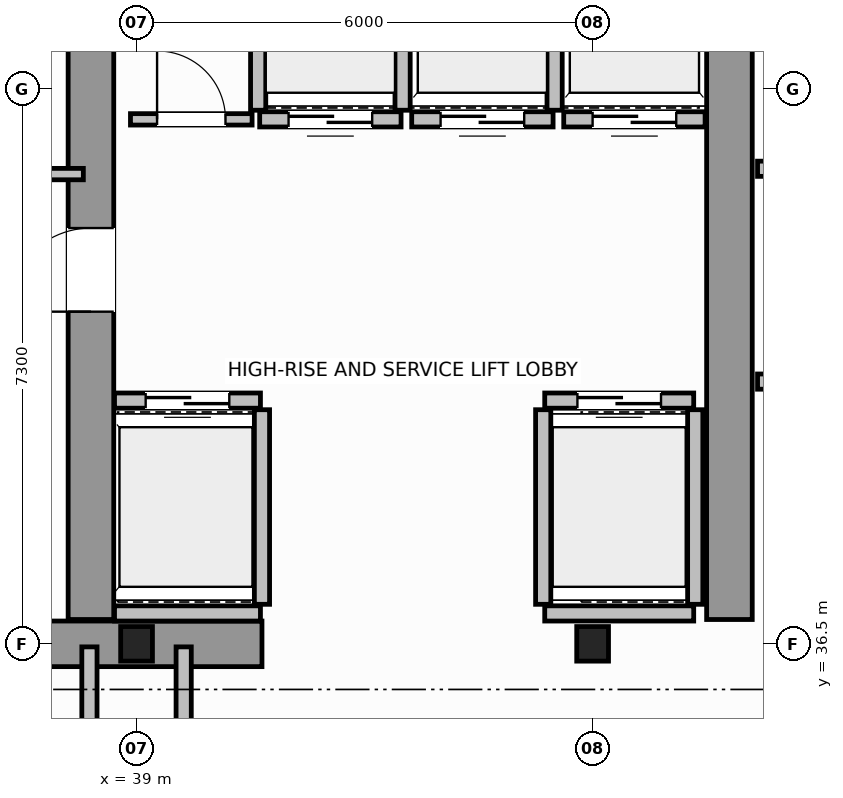
"""IFC4 building model, lengths in metres.
Left out: names, types, materials, properties, quantities, classifications, styles, units other than length and angle.
Written with IfcOpenShell. Run it as: python <this file> out.ifc"""

import sys

from ifc_helpers import new_model, si_unit, direction, frame, frame_2d, origin, origin_2d, place, context, subcontext, project, spatial, rectangle, i_section, extrude, source, transform, mapped, element, fill, save


model = new_model("IFC4")
c1 = context("Model", 3, precision=1e-05, world=origin(), true_north=direction((0.0, 1.0)))
c2 = subcontext(c1, "Body", "Model", "MODEL_VIEW")
j1 = project(units=[si_unit("LENGTHUNIT", "METRE"), si_unit("PLANEANGLEUNIT", "RADIAN")], contexts=[c1])
p1 = place(None, origin())
s1 = spatial("IfcSite", under=j1, at=p1, CompositionType="ELEMENT")
p2 = place(p1, origin())
s2 = spatial("IfcBuilding", under=s1, at=p2, CompositionType="ELEMENT")
p3 = place(p2, frame((0.0, 0.0, 218.4)))
s3 = spatial("IfcBuildingStorey", under=s2, at=p3, CompositionType="ELEMENT", Elevation=218.4)
m1 = source(origin(), c2, "Body", "SweptSolid", [
    extrude(i_section(OverallWidth=0.418, OverallDepth=0.455, WebThickness=0.042, FlangeThickness=0.058, FilletRadius=0.015, at=origin_2d()), origin(), (0.0, 0.0, 1.0), 4.8),
])
for number, where, z_axis, x_axis in (
    (1, (39.0, 36.5, 0.0), (0.0, 0.0, 1.0), (1.0, 0.0, 0.0)),
    (2, (45.0, 36.5, 0.0), (0.0, 0.0, 1.0), (1.0, 0.0, 0.0)),
):
    element("IfcColumn", number, at=place(p3, frame(where, z_axis=z_axis, x_axis=x_axis)), inside=s3, PredefinedType="COLUMN", context=c2, shape_type="MappedRepresentation", body=[
        mapped(m1, transform((0.0, 0.0, 0.0), scale=1.0)),
    ])
p4 = place(p3, frame((36.15, 36.5, 0.0), z_axis=(0.0, 0.0, 1.0), x_axis=(1.0, 0.0, 0.0)))
e3 = element("IfcWall", 3, at=p4, inside=s3, PredefinedType="SHEAR", context=c2, shape_type="SweptSolid", body=[
    extrude(rectangle(XDim=4.5, YDim=0.6, at=frame_2d((2.25, 0.0))), origin(), (0.0, 0.0, 1.0), 4.8),
])
p5 = place(p3, frame((38.4, 36.82, 0.0), z_axis=(0.0, 0.0, 1.0), x_axis=(0.0, 1.0, 0.0)))
e4 = element("IfcWall", 4, at=p5, inside=s3, PredefinedType="SHEAR", context=c2, shape_type="SweptSolid", body=[
    extrude(rectangle(XDim=9.38, YDim=0.6, at=frame_2d((4.69, 0.0))), origin(), (0.0, 0.0, 1.0), 4.8),
])
p6 = place(p5, frame((4.05, 0.0, 0.0)))
e5 = element("IfcOpeningElement", 5, at=p6, cuts=e4, PredefinedType="OPENING", context=c2, shape_type="SweptSolid", body=[
    extrude(rectangle(XDim=1.1, YDim=2.15, at=frame_2d((0.55, 1.075))), frame((0.0, 0.31, 0.0), z_axis=(0.0, -1.0, 0.0), x_axis=(1.0, 0.0, 0.0)), (0.0, 0.0, 1.0), 0.62),
])
p7 = place(p3, frame((46.8, 36.82, 0.0), z_axis=(0.0, 0.0, 1.0), x_axis=(0.0, 1.0, 0.0)))
e6 = element("IfcWall", 6, at=p7, inside=s3, PredefinedType="SHEAR", context=c2, shape_type="SweptSolid", body=[
    extrude(rectangle(XDim=9.38, YDim=0.6, at=frame_2d((4.69, 0.0))), origin(), (0.0, 0.0, 1.0), 4.8),
])
p8 = place(p3, frame((38.71, 39.7, 0.0), z_axis=(0.0, 0.0, 1.0), x_axis=(1.0, 0.0, 0.0)))
e7 = element("IfcWall", 7, at=p8, inside=s3, PredefinedType="SOLIDWALL", context=c2, shape_type="SweptSolid", body=[
    extrude(rectangle(XDim=1.92, YDim=0.2, at=frame_2d((0.96, 0.0))), origin(), (0.0, 0.0, 1.0), 4.54),
])
p9 = place(p8, frame((0.41, 0.0, 0.0)))
e8 = element("IfcOpeningElement", 8, at=p9, cuts=e7, PredefinedType="OPENING", context=c2, shape_type="SweptSolid", body=[
    extrude(rectangle(XDim=1.1, YDim=2.15, at=frame_2d((0.55, 1.075))), frame((0.0, 0.11, 0.0), z_axis=(0.0, -1.0, 0.0), x_axis=(1.0, 0.0, 0.0)), (0.0, 0.0, 1.0), 0.22),
])
p10 = place(p3, frame((38.71, 36.9, 0.0), z_axis=(0.0, 0.0, 1.0), x_axis=(1.0, 0.0, 0.0)))
e9 = element("IfcWall", 9, at=p10, inside=s3, PredefinedType="SOLIDWALL", context=c2, shape_type="SweptSolid", body=[
    extrude(rectangle(XDim=1.92, YDim=0.2, at=frame_2d((0.96, 0.0))), origin(), (0.0, 0.0, 1.0), 4.54),
])
p11 = place(p3, frame((40.65, 37.02, 0.0), z_axis=(0.0, 0.0, 1.0), x_axis=(0.0, 1.0, 0.0)))
e10 = element("IfcWall", 10, at=p11, inside=s3, PredefinedType="SOLIDWALL", context=c2, shape_type="SweptSolid", body=[
    extrude(rectangle(XDim=2.56, YDim=0.2, at=frame_2d((1.28, 0.0))), origin(), (0.0, 0.0, 1.0), 4.54),
])
p12 = place(p3, frame((44.37, 39.7, 0.0), z_axis=(0.0, 0.0, 1.0), x_axis=(1.0, 0.0, 0.0)))
e11 = element("IfcWall", 11, at=p12, inside=s3, PredefinedType="SOLIDWALL", context=c2, shape_type="SweptSolid", body=[
    extrude(rectangle(XDim=1.96, YDim=0.2, at=frame_2d((0.98, 0.0))), origin(), (0.0, 0.0, 1.0), 4.54),
])
p13 = place(p12, frame((0.43, 0.0, 0.0)))
e12 = element("IfcOpeningElement", 12, at=p13, cuts=e11, PredefinedType="OPENING", context=c2, shape_type="SweptSolid", body=[
    extrude(rectangle(XDim=1.1, YDim=2.15, at=frame_2d((0.55, 1.075))), frame((0.0, 0.11, 0.0), z_axis=(0.0, -1.0, 0.0), x_axis=(1.0, 0.0, 0.0)), (0.0, 0.0, 1.0), 0.22),
])
p14 = place(p3, frame((44.37, 36.9, 0.0), z_axis=(0.0, 0.0, 1.0), x_axis=(1.0, 0.0, 0.0)))
e13 = element("IfcWall", 13, at=p14, inside=s3, PredefinedType="SOLIDWALL", context=c2, shape_type="SweptSolid", body=[
    extrude(rectangle(XDim=1.96, YDim=0.2, at=frame_2d((0.98, 0.0))), origin(), (0.0, 0.0, 1.0), 3.53),
])
for number, where, z_axis, x_axis in (
    (14, (44.35, 37.02, 0.0), (0.0, 0.0, 1.0), (0.0, 1.0, 0.0)),
    (15, (46.35, 37.02, 0.0), (0.0, 0.0, 1.0), (0.0, 1.0, 0.0)),
):
    element("IfcWall", number, at=place(p3, frame(where, z_axis=z_axis, x_axis=x_axis)), inside=s3, PredefinedType="SOLIDWALL", context=c2, shape_type="SweptSolid", body=[
        extrude(rectangle(XDim=2.56, YDim=0.2, at=frame_2d((1.28, 0.0))), origin(), (0.0, 0.0, 1.0), 4.54),
    ])
p15 = place(p3, frame((40.62, 43.4, 0.0), z_axis=(0.0, 0.0, 1.0), x_axis=(1.0, 0.0, 0.0)))
e16 = element("IfcWall", 16, at=p15, inside=s3, PredefinedType="SOLIDWALL", context=c2, shape_type="SweptSolid", body=[
    extrude(rectangle(XDim=1.86, YDim=0.2, at=frame_2d((0.93, 0.0))), origin(), (0.0, 0.0, 1.0), 4.54),
])
p16 = place(p15, frame((0.38, 0.0, 0.0)))
e17 = element("IfcOpeningElement", 17, at=p16, cuts=e16, PredefinedType="OPENING", context=c2, shape_type="SweptSolid", body=[
    extrude(rectangle(XDim=1.1, YDim=2.15, at=frame_2d((0.55, 1.075))), frame((0.0, 0.11, 0.0), z_axis=(0.0, -1.0, 0.0), x_axis=(1.0, 0.0, 0.0)), (0.0, 0.0, 1.0), 0.22),
])
for number, where, z_axis, x_axis in (
    (18, (40.6, 43.52, 0.0), (0.0, 0.0, 1.0), (0.0, 1.0, 0.0)),
    (19, (42.5, 43.52, 0.0), (0.0, 0.0, 1.0), (0.0, 1.0, 0.0)),
):
    element("IfcWall", number, at=place(p3, frame(where, z_axis=z_axis, x_axis=x_axis)), inside=s3, PredefinedType="SOLIDWALL", context=c2, shape_type="SweptSolid", body=[
        extrude(rectangle(XDim=2.56, YDim=0.2, at=frame_2d((1.28, 0.0))), origin(), (0.0, 0.0, 1.0), 4.54),
    ])
p17 = place(p3, frame((42.62, 43.4, 0.0), z_axis=(0.0, 0.0, 1.0), x_axis=(1.0, 0.0, 0.0)))
e20 = element("IfcWall", 20, at=p17, inside=s3, PredefinedType="SOLIDWALL", context=c2, shape_type="SweptSolid", body=[
    extrude(rectangle(XDim=1.86, YDim=0.2, at=frame_2d((0.93, 0.0))), origin(), (0.0, 0.0, 1.0), 4.54),
])
p18 = place(p17, frame((0.38, 0.0, 0.0)))
e21 = element("IfcOpeningElement", 21, at=p18, cuts=e20, PredefinedType="OPENING", context=c2, shape_type="SweptSolid", body=[
    extrude(rectangle(XDim=1.1, YDim=2.15, at=frame_2d((0.55, 1.075))), frame((0.0, 0.11, 0.0), z_axis=(0.0, -1.0, 0.0), x_axis=(1.0, 0.0, 0.0)), (0.0, 0.0, 1.0), 0.22),
])
p19 = place(p3, frame((44.5, 43.52, 0.0), z_axis=(0.0, 0.0, 1.0), x_axis=(0.0, 1.0, 0.0)))
e22 = element("IfcWall", 22, at=p19, inside=s3, PredefinedType="SOLIDWALL", context=c2, shape_type="SweptSolid", body=[
    extrude(rectangle(XDim=2.56, YDim=0.2, at=frame_2d((1.28, 0.0))), origin(), (0.0, 0.0, 1.0), 4.54),
])
p20 = place(p3, frame((44.62, 43.4, 0.0), z_axis=(0.0, 0.0, 1.0), x_axis=(1.0, 0.0, 0.0)))
e23 = element("IfcWall", 23, at=p20, inside=s3, PredefinedType="SOLIDWALL", context=c2, shape_type="SweptSolid", body=[
    extrude(rectangle(XDim=1.86, YDim=0.2, at=frame_2d((0.93, 0.0))), origin(), (0.0, 0.0, 1.0), 4.54),
])
p21 = place(p20, frame((0.38, 0.0, 0.0)))
e24 = element("IfcOpeningElement", 24, at=p21, cuts=e23, PredefinedType="OPENING", context=c2, shape_type="SweptSolid", body=[
    extrude(rectangle(XDim=1.1, YDim=2.15, at=frame_2d((0.55, 1.075))), frame((0.0, 0.11, 0.0), z_axis=(0.0, -1.0, 0.0), x_axis=(1.0, 0.0, 0.0)), (0.0, 0.0, 1.0), 0.22),
])
p22 = place(p3, frame((47.17, 39.95, 0.0), z_axis=(0.0, 0.0, 1.0), x_axis=(1.0, 0.0, 0.0)))
e25 = element("IfcWall", 25, at=p22, inside=s3, PredefinedType="SOLIDWALL", context=c2, shape_type="SweptSolid", body=[
    extrude(rectangle(XDim=2.16, YDim=0.2, at=frame_2d((1.08, 0.0))), origin(), (0.0, 0.0, 1.0), 4.54),
])
p23 = place(p22, frame((0.53, 0.0, 0.0)))
e26 = element("IfcOpeningElement", 26, at=p23, cuts=e25, PredefinedType="OPENING", context=c2, shape_type="SweptSolid", body=[
    extrude(rectangle(XDim=1.1, YDim=2.15, at=frame_2d((0.55, 1.075))), frame((0.0, 0.11, 0.0), z_axis=(0.0, -1.0, 0.0), x_axis=(1.0, 0.0, 0.0)), (0.0, 0.0, 1.0), 0.22),
])
p24 = place(p3, frame((47.17, 42.75, 0.0), z_axis=(0.0, 0.0, 1.0), x_axis=(1.0, 0.0, 0.0)))
e27 = element("IfcWall", 27, at=p24, inside=s3, PredefinedType="SOLIDWALL", context=c2, shape_type="SweptSolid", body=[
    extrude(rectangle(XDim=2.16, YDim=0.2, at=frame_2d((1.08, 0.0))), origin(), (0.0, 0.0, 1.0), 4.54),
])
p25 = place(p3, frame((29.9, 42.68, 0.0), z_axis=(0.0, 0.0, 1.0), x_axis=(1.0, 0.0, 0.0)))
e28 = element("IfcWall", 28, at=p25, inside=s3, PredefinedType="PARTITIONING", context=c2, shape_type="SweptSolid", body=[
    extrude(rectangle(XDim=8.4, YDim=0.15, at=frame_2d((4.2, 0.0))), origin(), (0.0, 0.0, 1.0), 4.54),
])
p26 = place(p25, frame((3.4, 0.0, 0.0)))
e29 = element("IfcOpeningElement", 29, at=p26, cuts=e28, PredefinedType="OPENING", context=c2, shape_type="SweptSolid", body=[
    extrude(rectangle(XDim=0.9, YDim=2.1, at=frame_2d((0.45, 1.05))), frame((0.0, 0.085, 0.0), z_axis=(0.0, -1.0, 0.0), x_axis=(1.0, 0.0, 0.0)), (0.0, 0.0, 1.0), 0.17),
])
p27 = place(p3, frame((38.92, 43.4, 0.0), z_axis=(0.0, 0.0, 1.0), x_axis=(1.0, 0.0, 0.0)))
e30 = element("IfcWall", 30, at=p27, inside=s3, PredefinedType="PARTITIONING", context=c2, shape_type="SweptSolid", body=[
    extrude(rectangle(XDim=1.6, YDim=0.15, at=frame_2d((0.8, 0.0))), origin(), (0.0, 0.0, 1.0), 4.54),
])
p28 = place(p27, frame((0.35, 0.0, 0.0)))
e31 = element("IfcOpeningElement", 31, at=p28, cuts=e30, PredefinedType="OPENING", context=c2, shape_type="SweptSolid", body=[
    extrude(rectangle(XDim=0.9, YDim=2.1, at=frame_2d((0.45, 1.05))), frame((0.0, 0.085, 0.0), z_axis=(0.0, -1.0, 0.0), x_axis=(1.0, 0.0, 0.0)), (0.0, 0.0, 1.0), 0.17),
])
for number, where, z_axis, x_axis in (
    (32, (38.38, 28.16, 0.0), (0.0, 0.0, 1.0), (0.0, 1.0, 0.0)),
    (33, (39.62, 28.16, 0.0), (0.0, 0.0, 1.0), (0.0, 1.0, 0.0)),
):
    element("IfcWall", number, at=place(p3, frame(where, z_axis=z_axis, x_axis=x_axis)), inside=s3, PredefinedType="SOLIDWALL", context=c2, shape_type="SweptSolid", body=[
        extrude(rectangle(XDim=8.3, YDim=0.2, at=frame_2d((4.15, 0.0))), origin(), (0.0, 0.0, 1.0), 4.54),
    ])
m2 = source(origin(), c2, "Body", "SweptSolid", [
    extrude(rectangle(XDim=1.1, YDim=2.15, at=frame_2d((0.55, 1.075))), frame((0.0, 0.025, 0.0), z_axis=(0.0, -1.0, 0.0), x_axis=(1.0, 0.0, 0.0)), (0.0, 0.0, 1.0), 0.05),
])
p29 = place(p9, origin())
e34 = element("IfcDoor", 34, at=p29, inside=s3, OperationType="DOUBLE_DOOR_SLIDING", PredefinedType="DOOR", context=c2, shape_type="MappedRepresentation", body=[
    mapped(m2, transform((0.0, 0.0, 0.0), scale=1.0)),
])
fill(e8, e34)
p30 = place(p13, origin())
e35 = element("IfcDoor", 35, at=p30, inside=s3, OperationType="DOUBLE_DOOR_SLIDING", PredefinedType="DOOR", context=c2, shape_type="MappedRepresentation", body=[
    mapped(m2, transform((0.0, 0.0, 0.0), scale=1.0)),
])
fill(e12, e35)
p31 = place(p16, origin())
e36 = element("IfcDoor", 36, at=p31, inside=s3, OperationType="DOUBLE_DOOR_SLIDING", PredefinedType="DOOR", context=c2, shape_type="MappedRepresentation", body=[
    mapped(m2, transform((0.0, 0.0, 0.0), scale=1.0)),
])
fill(e17, e36)
p32 = place(p18, origin())
e37 = element("IfcDoor", 37, at=p32, inside=s3, OperationType="DOUBLE_DOOR_SLIDING", PredefinedType="DOOR", context=c2, shape_type="MappedRepresentation", body=[
    mapped(m2, transform((0.0, 0.0, 0.0), scale=1.0)),
])
fill(e21, e37)
p33 = place(p21, origin())
e38 = element("IfcDoor", 38, at=p33, inside=s3, OperationType="DOUBLE_DOOR_SLIDING", PredefinedType="DOOR", context=c2, shape_type="MappedRepresentation", body=[
    mapped(m2, transform((0.0, 0.0, 0.0), scale=1.0)),
])
fill(e24, e38)
p34 = place(p6, origin())
e39 = element("IfcDoor", 39, at=p34, inside=s3, OperationType="SINGLE_SWING_RIGHT", PredefinedType="DOOR", context=c2, shape_type="MappedRepresentation", body=[
    mapped(m2, transform((0.0, 0.0, 0.0), scale=1.0)),
])
fill(e5, e39)
m3 = source(origin(), c2, "Body", "SweptSolid", [
    extrude(rectangle(XDim=0.9, YDim=2.1, at=frame_2d((0.45, 1.05))), frame((0.0, 0.025, 0.0), z_axis=(0.0, -1.0, 0.0), x_axis=(1.0, 0.0, 0.0)), (0.0, 0.0, 1.0), 0.05),
])
p35 = place(p28, origin())
e40 = element("IfcDoor", 40, at=p35, inside=s3, OperationType="SINGLE_SWING_LEFT", PredefinedType="DOOR", context=c2, shape_type="MappedRepresentation", body=[
    mapped(m3, transform((0.0, 0.0, 0.0), scale=1.0)),
])
fill(e31, e40)
save(model, sys.argv[1])
